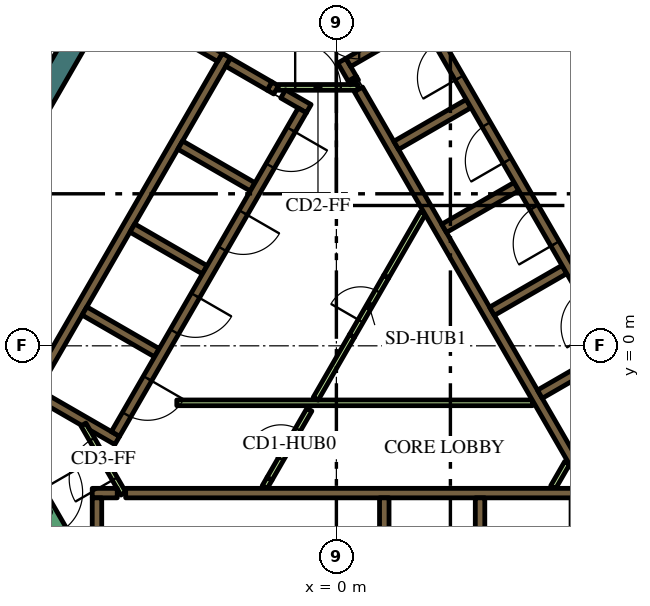
"""IFC4 building model, lengths in metres.
Left out: names, types, materials, properties, quantities, classifications, styles, units other than length and angle.
Written with IfcOpenShell. Run it as: python <this file> out.ifc"""

import sys

from ifc_helpers import new_model, si_unit, direction, frame, frame_2d, origin, place, context, subcontext, project, spatial, polyline, rectangle, outline, extrude, element, fill, save


model = new_model("IFC4")
c1 = context("Model", 3, precision=1e-05, world=origin(), true_north=direction((0.0, 1.0)))
c2 = subcontext(c1, "Body", "Model", "MODEL_VIEW")
j1 = project(units=[si_unit("LENGTHUNIT", "METRE"), si_unit("PLANEANGLEUNIT", "RADIAN")], contexts=[c1])
p1 = place(None, origin())
s1 = spatial("IfcSite", under=j1, at=p1, CompositionType="ELEMENT")
p2 = place(p1, origin())
s2 = spatial("IfcBuilding", under=s1, at=p2, CompositionType="ELEMENT")
p3 = place(p2, frame((0.0, 0.0, 321.6)))
s3 = spatial("IfcBuildingStorey", under=s2, at=p3, CompositionType="ELEMENT", Elevation=321.6)
p4 = place(p3, frame((1.989, 16.456, 0.0), z_axis=(0.0, 0.0, 1.0), x_axis=(0.49999102663, -0.8660305845, 0.0)))
e1 = element("IfcWall", 1, at=p4, inside=s3, PredefinedType="SOLIDWALL", context=c2, shape_type="SweptSolid", body=[
    extrude(rectangle(XDim=12.406, YDim=0.6, at=frame_2d((6.203, 0.0))), origin(), (0.0, 0.0, 1.0), 6.0),
])
p5 = place(p3, frame((-4.652, 11.842, 0.0), z_axis=(0.0, 0.0, 1.0), x_axis=(-0.500003640647, -0.866023301845, 0.0)))
e2 = element("IfcWall", 2, at=p5, inside=s3, PredefinedType="SOLIDWALL", context=c2, shape_type="SweptSolid", body=[
    extrude(rectangle(XDim=15.858, YDim=0.6, at=frame_2d((7.929, 0.0))), origin(), (0.0, 0.0, 1.0), 6.0),
])
p6 = place(p3, frame((-5.545, -3.875, 0.0), z_axis=(0.0, 0.0, 1.0), x_axis=(1.0, 0.0, 0.0)))
e3 = element("IfcWall", 3, at=p6, inside=s3, PredefinedType="SOLIDWALL", context=c2, shape_type="SweptSolid", body=[
    extrude(rectangle(XDim=11.97, YDim=0.25, at=frame_2d((5.985, 0.0))), origin(), (0.0, 0.0, 1.0), 6.0),
])
p7 = place(p3, frame((-6.425, -3.875, 0.0), z_axis=(0.0, 0.0, 1.0), x_axis=(1.0, 0.0, 0.0)))
e4 = element("IfcWall", 4, at=p7, inside=s3, PredefinedType="SOLIDWALL", context=c2, shape_type="SweptSolid", body=[
    extrude(rectangle(XDim=0.658, YDim=0.25, at=frame_2d((0.329, 0.0))), origin(), (0.0, 0.0, 1.0), 6.0),
])
for number, where, z_axis, x_axis in (
    (5, (3.78, -4.0, 0.0), (0.0, 0.0, 1.0), (0.0, -1.0, 0.0)),
    (6, (1.26, -4.0, 0.0), (0.0, 0.0, 1.0), (0.0, -1.0, 0.0)),
):
    element("IfcWall", number, at=place(p3, frame(where, z_axis=z_axis, x_axis=x_axis)), inside=s3, PredefinedType="SOLIDWALL", context=c2, shape_type="SweptSolid", body=[
        extrude(rectangle(XDim=2.2, YDim=0.25, at=frame_2d((1.1, 0.0))), origin(), (0.0, 0.0, 1.0), 6.0),
    ])
p8 = place(p3, frame((-6.3, -7.125, 0.0), z_axis=(0.0, 0.0, 1.0), x_axis=(0.0, 1.0, 0.0)))
e7 = element("IfcWall", 7, at=p8, inside=s3, PredefinedType="SOLIDWALL", context=c2, shape_type="SweptSolid", body=[
    extrude(rectangle(XDim=3.125, YDim=0.25, at=frame_2d((1.562, 0.0))), origin(), (0.0, 0.0, 1.0), 6.0),
])
p9 = place(p3, frame((0.473, 6.93, 0.0), z_axis=(0.0, 0.0, 1.0), x_axis=(-0.49972245349, 0.866185586049, 0.0)))
e8 = element("IfcWall", 8, at=p9, inside=s3, PredefinedType="SOLIDWALL", context=c2, shape_type="SweptSolid", body=[
    extrude(rectangle(XDim=0.11, YDim=0.25, at=frame_2d((0.055, 0.0))), origin(), (0.0, 0.0, 1.0), 6.0),
])
p10 = place(p3, frame((6.568, -3.627, 0.0), z_axis=(0.0, 0.0, 1.0), x_axis=(-0.499999455981, 0.866025717874, 0.0)))
e9 = element("IfcWall", 9, at=p10, inside=s3, PredefinedType="SOLIDWALL", context=c2, shape_type="SweptSolid", body=[
    extrude(rectangle(XDim=11.978, YDim=0.25, at=frame_2d((5.989, 0.0))), origin(), (0.0, 0.0, 1.0), 6.0),
])
p11 = place(p3, frame((0.417, 7.027, 0.0), z_axis=(0.0, 0.0, 1.0), x_axis=(-0.500210807569, 0.865903659763, 0.0)))
e10 = element("IfcWall", 10, at=p11, inside=s3, PredefinedType="SOLIDWALL", context=c2, shape_type="SweptSolid", body=[
    extrude(rectangle(XDim=0.548, YDim=0.25, at=frame_2d((0.274, 0.0))), origin(), (0.0, 0.0, 1.0), 6.0),
])
p12 = place(p3, frame((3.1, 9.064, 0.0), z_axis=(0.0, 0.0, 1.0), x_axis=(-0.866030133475, -0.499991807846, 0.0)))
e11 = element("IfcWall", 11, at=p12, inside=s3, PredefinedType="SOLIDWALL", context=c2, shape_type="SweptSolid", body=[
    extrude(rectangle(XDim=3.217, YDim=0.25, at=frame_2d((1.608, 0.0))), origin(), (0.0, 0.0, 1.0), 6.0),
])
p13 = place(p3, frame((1.574, 5.274, 0.0), z_axis=(0.0, 0.0, 1.0), x_axis=(0.866028486751, 0.499994660107, 0.0)))
e12 = element("IfcWall", 12, at=p13, inside=s3, PredefinedType="SOLIDWALL", context=c2, shape_type="SweptSolid", body=[
    extrude(rectangle(XDim=2.2, YDim=0.25, at=frame_2d((1.1, 0.0))), origin(), (0.0, 0.0, 1.0), 6.0),
])
for number, where, z_axis, x_axis in (
    (13, (2.834, 3.091, 0.0), (0.0, 0.0, 1.0), (0.866, 0.5, 0.0)),
    (14, (4.094, 0.909, 0.0), (0.0, 0.0, 1.0), (0.866, 0.5, 0.0)),
    (15, (5.354, -1.274, 0.0), (0.0, 0.0, 1.0), (0.866, 0.5, 0.0)),
):
    element("IfcWall", number, at=place(p3, frame(where, z_axis=z_axis, x_axis=x_axis)), inside=s3, PredefinedType="SOLIDWALL", context=c2, shape_type="SweptSolid", body=[
        extrude(rectangle(XDim=2.2, YDim=0.25, at=frame_2d((1.1, 0.0))), origin(), (0.0, 0.0, 1.0), 6.0),
    ])
p14 = place(p3, frame((-8.06, -1.311, 0.0), z_axis=(0.0, 0.0, 1.0), x_axis=(0.50000273126, 0.866023826885, 0.0)))
e16 = element("IfcWall", 16, at=p14, inside=s3, PredefinedType="SOLIDWALL", context=c2, shape_type="SweptSolid", body=[
    extrude(rectangle(XDim=10.33, YDim=0.25, at=frame_2d((5.165, 0.0))), origin(), (0.0, 0.0, 1.0), 6.0),
])
p15 = place(p3, frame((-1.758, 6.835, 0.0), z_axis=(0.0, 0.0, 1.0), x_axis=(0.865982457891, -0.500074377092, 0.0)))
e17 = element("IfcWall", 17, at=p15, inside=s3, PredefinedType="SOLIDWALL", context=c2, shape_type="SweptSolid", body=[
    extrude(rectangle(XDim=0.2, YDim=0.25, at=frame_2d((0.1, 0.0))), origin(), (0.0, 0.0, 1.0), 6.0),
])
p16 = place(p3, frame((-1.76, 6.836, 0.0), z_axis=(0.0, 0.0, 1.0), x_axis=(-0.865952863304, 0.500125622755, 0.0)))
e18 = element("IfcWall", 18, at=p16, inside=s3, PredefinedType="SOLIDWALL", context=c2, shape_type="SweptSolid", body=[
    extrude(rectangle(XDim=1.258, YDim=0.25, at=frame_2d((0.629, 0.0))), origin(), (0.0, 0.0, 1.0), 6.0),
])
p17 = place(p3, frame((-0.728, 6.24, 0.0), z_axis=(0.0, 0.0, 1.0), x_axis=(-0.865955664968, 0.500120771724, 0.0)))
e19 = element("IfcWall", 19, at=p17, inside=s3, PredefinedType="SOLIDWALL", context=c2, shape_type="SweptSolid", body=[
    extrude(rectangle(XDim=0.778, YDim=0.25, at=frame_2d((0.389, 0.0))), origin(), (0.0, 0.0, 1.0), 6.0),
])
for number, where, z_axis, x_axis in (
    (20, (-2.204, 4.182, 0.0), (0.0, 0.0, 1.0), (-0.866, 0.5, 0.0)),
    (21, (-5.369, 3.1, 0.0), (0.0, 0.0, 1.0), (0.866, -0.5, 0.0)),
    (22, (-4.724, -0.182, 0.0), (0.0, 0.0, 1.0), (-0.866, 0.5, 0.0)),
):
    element("IfcWall", number, at=place(p3, frame(where, z_axis=z_axis, x_axis=x_axis)), inside=s3, PredefinedType="SOLIDWALL", context=c2, shape_type="SweptSolid", body=[
        extrude(rectangle(XDim=2.2, YDim=0.25, at=frame_2d((1.1, 0.0))), origin(), (0.0, 0.0, 1.0), 6.0),
    ])
p18 = place(p3, origin())
e23 = element("IfcWall", 23, at=p18, inside=s3, PredefinedType="SOLIDWALL", context=c2, shape_type="SweptSolid", body=[
    extrude(outline(polyline([(-5.922, -2.257), (-5.922, -2.257), (-5.705, -2.382), (-5.83, -2.598), (-6.483, -2.221), (-6.591, -2.033), (-6.591, -2.033), (-6.7, -2.096), (-7.952, -1.373), (-7.827, -1.156), (-5.922, -2.257)])), origin(), (0.0, 0.0, 1.0), 6.0),
])
p19 = place(p3, frame((-3.066, 7.59, 0.0), z_axis=(0.0, 0.0, 1.0), x_axis=(-0.866081358704, 0.49990307071, 0.0)))
e24 = element("IfcWall", 24, at=p19, inside=s3, PredefinedType="SOLIDWALL", context=c2, shape_type="SweptSolid", body=[
    extrude(rectangle(XDim=0.858, YDim=0.25, at=frame_2d((0.429, 0.0))), origin(), (0.0, 0.0, 1.0), 6.0),
])
p20 = place(p3, frame((5.705, -3.718, 0.0), z_axis=(0.0, 0.0, 1.0), x_axis=(0.499962090823, 0.866047289552, 0.0)))
e25 = element("IfcWall", 25, at=p20, inside=s3, PredefinedType="PARTITIONING", context=c2, shape_type="SweptSolid", body=[
    extrude(rectangle(XDim=0.735, YDim=0.15, at=frame_2d((0.367, 0.0))), origin(), (0.0, 0.0, 1.0), 5.3),
])
p21 = place(p3, frame((-4.2, -1.5, 0.0), z_axis=(0.0, 0.0, 1.0), x_axis=(1.0, 0.0, 0.0)))
e26 = element("IfcWall", 26, at=p21, inside=s3, PredefinedType="PARTITIONING", context=c2, shape_type="SweptSolid", body=[
    extrude(rectangle(XDim=9.359, YDim=0.15, at=frame_2d((4.68, 0.0))), origin(), (0.0, 0.0, 1.0), 5.3),
])
p22 = place(p3, frame((-0.544, -1.393, 0.0), z_axis=(0.0, 0.0, 1.0), x_axis=(0.499928740635, 0.866066541489, 0.0)))
e27 = element("IfcWall", 27, at=p22, inside=s3, PredefinedType="PARTITIONING", context=c2, shape_type="SweptSolid", body=[
    extrude(rectangle(XDim=1.912, YDim=0.15, at=frame_2d((0.956, 0.0))), origin(), (0.0, 0.0, 1.0), 5.3),
])
p23 = place(p3, frame((1.312, 1.822, 0.0), z_axis=(0.0, 0.0, 1.0), x_axis=(0.500003549559, 0.866023354436, 0.0)))
e28 = element("IfcWall", 28, at=p23, inside=s3, PredefinedType="PARTITIONING", context=c2, shape_type="SweptSolid", body=[
    extrude(rectangle(XDim=1.93, YDim=0.15, at=frame_2d((0.965, 0.0))), origin(), (0.0, 0.0, 1.0), 5.3),
])
p24 = place(p3, frame((-1.887, -3.718, 0.0), z_axis=(0.0, 0.0, 1.0), x_axis=(0.500165633897, 0.865929753888, 0.0)))
e29 = element("IfcWall", 29, at=p24, inside=s3, PredefinedType="PARTITIONING", context=c2, shape_type="SweptSolid", body=[
    extrude(rectangle(XDim=0.254, YDim=0.15, at=frame_2d((0.127, 0.0))), origin(), (0.0, 0.0, 1.0), 5.3),
])
p25 = place(p3, frame((8.565, -2.185, 0.0), z_axis=(0.0, 0.0, 1.0), x_axis=(-0.499997954832, 0.866026584559, 0.0)))
e30 = element("IfcWall", 30, at=p25, inside=s3, PredefinedType="SOLIDWALL", context=c2, shape_type="SweptSolid", body=[
    extrude(rectangle(XDim=12.35, YDim=0.25, at=frame_2d((6.175, 0.0))), origin(), (0.0, 0.0, 1.0), 6.0),
])
p26 = place(p25, frame((0.685, 0.0, 0.0)))
e31 = element("IfcOpeningElement", 31, at=p26, cuts=e30, PredefinedType="OPENING", context=c2, shape_type="SweptSolid", body=[
    extrude(rectangle(XDim=0.9, YDim=2.1, at=frame_2d((0.45, 1.05))), frame((0.0, 0.135, 0.0), z_axis=(0.0, -1.0, 0.0), x_axis=(1.0, 0.0, 0.0)), (0.0, 0.0, 1.0), 0.27),
])
p27 = place(p25, frame((3.105, 0.0, 0.0)))
e32 = element("IfcOpeningElement", 32, at=p27, cuts=e30, PredefinedType="OPENING", context=c2, shape_type="SweptSolid", body=[
    extrude(rectangle(XDim=1.1, YDim=2.1, at=frame_2d((0.55, 1.05))), frame((0.0, 0.135, 0.0), z_axis=(0.0, -1.0, 0.0), x_axis=(1.0, 0.0, 0.0)), (0.0, 0.0, 1.0), 0.27),
])
p28 = place(p25, frame((5.625, 0.0, 0.0)))
e33 = element("IfcOpeningElement", 33, at=p28, cuts=e30, PredefinedType="OPENING", context=c2, shape_type="SweptSolid", body=[
    extrude(rectangle(XDim=1.1, YDim=2.1, at=frame_2d((0.55, 1.05))), frame((0.0, 0.135, 0.0), z_axis=(0.0, -1.0, 0.0), x_axis=(1.0, 0.0, 0.0)), (0.0, 0.0, 1.0), 0.27),
])
p29 = place(p25, frame((8.145, 0.0, 0.0)))
e34 = element("IfcOpeningElement", 34, at=p29, cuts=e30, PredefinedType="OPENING", context=c2, shape_type="SweptSolid", body=[
    extrude(rectangle(XDim=1.1, YDim=2.1, at=frame_2d((0.55, 1.05))), frame((0.0, 0.135, 0.0), z_axis=(0.0, -1.0, 0.0), x_axis=(1.0, 0.0, 0.0)), (0.0, 0.0, 1.0), 0.27),
])
p30 = place(p25, frame((10.665, 0.0, 0.0)))
e35 = element("IfcOpeningElement", 35, at=p30, cuts=e30, PredefinedType="OPENING", context=c2, shape_type="SweptSolid", body=[
    extrude(rectangle(XDim=1.1, YDim=2.1, at=frame_2d((0.55, 1.05))), frame((0.0, 0.135, 0.0), z_axis=(0.0, -1.0, 0.0), x_axis=(1.0, 0.0, 0.0)), (0.0, 0.0, 1.0), 0.27),
])
p31 = place(p3, frame((-0.898, 6.194, 0.0), z_axis=(0.0, 0.0, 1.0), x_axis=(-0.499996202215, -0.866027596426, 0.0)))
e36 = element("IfcWall", 36, at=p31, inside=s3, PredefinedType="SOLIDWALL", context=c2, shape_type="SweptSolid", body=[
    extrude(rectangle(XDim=9.83, YDim=0.25, at=frame_2d((4.915, 0.0))), origin(), (0.0, 0.0, 1.0), 6.0),
])
p32 = place(p31, frame((0.585, 0.0, 0.0)))
e37 = element("IfcOpeningElement", 37, at=p32, cuts=e36, PredefinedType="OPENING", context=c2, shape_type="SweptSolid", body=[
    extrude(rectangle(XDim=1.1, YDim=2.1, at=frame_2d((0.55, 1.05))), frame((0.0, 0.135, 0.0), z_axis=(0.0, -1.0, 0.0), x_axis=(1.0, 0.0, 0.0)), (0.0, 0.0, 1.0), 0.27),
])
p33 = place(p31, frame((3.105, 0.0, 0.0)))
e38 = element("IfcOpeningElement", 38, at=p33, cuts=e36, PredefinedType="OPENING", context=c2, shape_type="SweptSolid", body=[
    extrude(rectangle(XDim=1.1, YDim=2.1, at=frame_2d((0.55, 1.05))), frame((0.0, 0.135, 0.0), z_axis=(0.0, -1.0, 0.0), x_axis=(1.0, 0.0, 0.0)), (0.0, 0.0, 1.0), 0.27),
])
p34 = place(p31, frame((5.625, 0.0, 0.0)))
e39 = element("IfcOpeningElement", 39, at=p34, cuts=e36, PredefinedType="OPENING", context=c2, shape_type="SweptSolid", body=[
    extrude(rectangle(XDim=1.1, YDim=2.1, at=frame_2d((0.55, 1.05))), frame((0.0, 0.135, 0.0), z_axis=(0.0, -1.0, 0.0), x_axis=(1.0, 0.0, 0.0)), (0.0, 0.0, 1.0), 0.27),
])
p35 = place(p31, frame((8.145, 0.0, 0.0)))
e40 = element("IfcOpeningElement", 40, at=p35, cuts=e36, PredefinedType="OPENING", context=c2, shape_type="SweptSolid", body=[
    extrude(rectangle(XDim=1.1, YDim=2.1, at=frame_2d((0.55, 1.05))), frame((0.0, 0.135, 0.0), z_axis=(0.0, -1.0, 0.0), x_axis=(1.0, 0.0, 0.0)), (0.0, 0.0, 1.0), 0.27),
])
p36 = place(p3, frame((-8.103, -3.466, 0.0), z_axis=(0.0, 0.0, 1.0), x_axis=(0.500078061341, -0.865980330357, 0.0)))
e41 = element("IfcWall", 41, at=p36, inside=s3, PredefinedType="SOLIDWALL", context=c2, shape_type="SweptSolid", body=[
    extrude(rectangle(XDim=2.1, YDim=0.4, at=frame_2d((1.05, 0.0))), origin(), (0.0, 0.0, 1.0), 6.0),
])
p37 = place(p36, frame((0.45, 0.0, 0.0)))
e42 = element("IfcOpeningElement", 42, at=p37, cuts=e41, PredefinedType="OPENING", context=c2, shape_type="SweptSolid", body=[
    extrude(rectangle(XDim=1.2, YDim=2.1, at=frame_2d((0.6, 1.05))), frame((0.0, 0.21, 0.0), z_axis=(0.0, -1.0, 0.0), x_axis=(1.0, 0.0, 0.0)), (0.0, 0.0, 1.0), 0.42),
])
p38 = place(p3, frame((-1.76, -3.498, 0.0), z_axis=(0.0, 0.0, 1.0), x_axis=(0.499977374825, 0.866038466041, 0.0)))
e43 = element("IfcWall", 43, at=p38, inside=s3, PredefinedType="PARTITIONING", context=c2, shape_type="SweptSolid", body=[
    extrude(rectangle(XDim=2.1, YDim=0.15, at=frame_2d((1.05, 0.0))), origin(), (0.0, 0.0, 1.0), 5.3),
])
p39 = place(p38, frame((0.6, 0.0, 0.0)))
e44 = element("IfcOpeningElement", 44, at=p39, cuts=e43, PredefinedType="OPENING", context=c2, shape_type="SweptSolid", body=[
    extrude(rectangle(XDim=0.9, YDim=2.1, at=frame_2d((0.45, 1.05))), frame((0.0, 0.085, 0.0), z_axis=(0.0, -1.0, 0.0), x_axis=(1.0, 0.0, 0.0)), (0.0, 0.0, 1.0), 0.17),
])
p40 = place(p3, frame((-1.534, 6.8, 0.0), z_axis=(0.0, 0.0, 1.0), x_axis=(1.0, 0.0, 0.0)))
e45 = element("IfcWall", 45, at=p40, inside=s3, PredefinedType="PARTITIONING", context=c2, shape_type="SweptSolid", body=[
    extrude(rectangle(XDim=2.1, YDim=0.15, at=frame_2d((1.05, 0.0))), origin(), (0.0, 0.0, 1.0), 5.3),
])
p41 = place(p40, frame((0.45, 0.0, 0.0)))
e46 = element("IfcOpeningElement", 46, at=p41, cuts=e45, PredefinedType="OPENING", context=c2, shape_type="SweptSolid", body=[
    extrude(rectangle(XDim=1.2, YDim=2.1, at=frame_2d((0.6, 1.05))), frame((0.0, 0.085, 0.0), z_axis=(0.0, -1.0, 0.0), x_axis=(1.0, 0.0, 0.0)), (0.0, 0.0, 1.0), 0.17),
])
p42 = place(p3, frame((-5.606, -3.89, 0.0), z_axis=(0.0, 0.0, 1.0), x_axis=(-0.500027713859, 0.866009402589, 0.0)))
e47 = element("IfcWall", 47, at=p42, inside=s3, PredefinedType="PARTITIONING", context=c2, shape_type="SweptSolid", body=[
    extrude(rectangle(XDim=2.1, YDim=0.15, at=frame_2d((1.05, 0.0))), origin(), (0.0, 0.0, 1.0), 5.3),
])
p43 = place(p42, frame((0.45, 0.0, 0.0)))
e48 = element("IfcOpeningElement", 48, at=p43, cuts=e47, PredefinedType="OPENING", context=c2, shape_type="SweptSolid", body=[
    extrude(rectangle(XDim=1.2, YDim=2.1, at=frame_2d((0.6, 1.05))), frame((0.0, 0.085, 0.0), z_axis=(0.0, -1.0, 0.0), x_axis=(1.0, 0.0, 0.0)), (0.0, 0.0, 1.0), 0.17),
])
p44 = place(p3, frame((0.412, 0.263, 0.0), z_axis=(0.0, 0.0, 1.0), x_axis=(0.500062916607, 0.865989075817, 0.0)))
e49 = element("IfcWall", 49, at=p44, inside=s3, PredefinedType="PARTITIONING", context=c2, shape_type="SweptSolid", body=[
    extrude(rectangle(XDim=1.8, YDim=0.15, at=frame_2d((0.9, 0.0))), origin(), (0.0, 0.0, 1.0), 5.3),
])
p45 = place(p44, frame((0.45, 0.0, 0.0)))
e50 = element("IfcOpeningElement", 50, at=p45, cuts=e49, PredefinedType="OPENING", context=c2, shape_type="SweptSolid", body=[
    extrude(rectangle(XDim=0.9, YDim=2.1, at=frame_2d((0.45, 1.05))), frame((0.0, 0.085, 0.0), z_axis=(0.0, -1.0, 0.0), x_axis=(1.0, 0.0, 0.0)), (0.0, 0.0, 1.0), 0.17),
])
p46 = place(p3, frame((-3.984, 19.6, 0.0), z_axis=(0.0, 0.0, 1.0), x_axis=(-0.500001742692, -0.866024397638, 0.0)))
e51 = element("IfcWall", 51, at=p46, inside=s3, PredefinedType="PARTITIONING", context=c2, shape_type="SweptSolid", body=[
    extrude(rectangle(XDim=29.965, YDim=0.15, at=frame_2d((14.982, 0.0))), origin(), (0.0, 0.0, 1.0), 5.3),
])
p47 = place(p46, frame((14.082, 0.0, 0.0)))
e52 = element("IfcOpeningElement", 52, at=p47, cuts=e51, PredefinedType="OPENING", context=c2, shape_type="SweptSolid", body=[
    extrude(rectangle(XDim=1.8, YDim=2.1, at=frame_2d((0.9, 1.05))), frame((0.0, 0.085, 0.0), z_axis=(0.0, -1.0, 0.0), x_axis=(1.0, 0.0, 0.0)), (0.0, 0.0, 1.0), 0.17),
])
p48 = place(p46, frame((9.894, 0.0, 0.0)))
e53 = element("IfcOpeningElement", 53, at=p48, cuts=e51, PredefinedType="OPENING", context=c2, shape_type="SweptSolid", body=[
    extrude(rectangle(XDim=1.8, YDim=2.1, at=frame_2d((0.9, 1.05))), frame((0.0, 0.085, 0.0), z_axis=(0.0, -1.0, 0.0), x_axis=(1.0, 0.0, 0.0)), (0.0, 0.0, 1.0), 0.17),
])
p49 = place(p28, origin())
e54 = element("IfcDoor", 54, at=p49, inside=s3, OperationType="DOUBLE_DOOR_SLIDING", PredefinedType="DOOR", context=c2, shape_type="SweptSolid", body=[
    extrude(rectangle(XDim=1.1, YDim=2.1, at=frame_2d((0.55, 1.05))), frame((0.0, 0.025, 0.0), z_axis=(0.0, -1.0, 0.0), x_axis=(1.0, 0.0, 0.0)), (0.0, 0.0, 1.0), 0.05),
])
fill(e33, e54)
p50 = place(p29, origin())
e55 = element("IfcDoor", 55, at=p50, inside=s3, OperationType="DOUBLE_DOOR_SLIDING", PredefinedType="DOOR", context=c2, shape_type="SweptSolid", body=[
    extrude(rectangle(XDim=1.1, YDim=2.1, at=frame_2d((0.55, 1.05))), frame((0.0, 0.025, 0.0), z_axis=(0.0, -1.0, 0.0), x_axis=(1.0, 0.0, 0.0)), (0.0, 0.0, 1.0), 0.05),
])
fill(e34, e55)
p51 = place(p30, origin())
e56 = element("IfcDoor", 56, at=p51, inside=s3, OperationType="DOUBLE_DOOR_SLIDING", PredefinedType="DOOR", context=c2, shape_type="SweptSolid", body=[
    extrude(rectangle(XDim=1.1, YDim=2.1, at=frame_2d((0.55, 1.05))), frame((0.0, 0.025, 0.0), z_axis=(0.0, -1.0, 0.0), x_axis=(1.0, 0.0, 0.0)), (0.0, 0.0, 1.0), 0.05),
])
fill(e35, e56)
p52 = place(p32, origin())
e57 = element("IfcDoor", 57, at=p52, inside=s3, OperationType="DOUBLE_DOOR_SLIDING", PredefinedType="DOOR", context=c2, shape_type="SweptSolid", body=[
    extrude(rectangle(XDim=1.1, YDim=2.1, at=frame_2d((0.55, 1.05))), frame((0.0, 0.025, 0.0), z_axis=(0.0, -1.0, 0.0), x_axis=(1.0, 0.0, 0.0)), (0.0, 0.0, 1.0), 0.05),
])
fill(e37, e57)
p53 = place(p33, origin())
e58 = element("IfcDoor", 58, at=p53, inside=s3, OperationType="DOUBLE_DOOR_SLIDING", PredefinedType="DOOR", context=c2, shape_type="SweptSolid", body=[
    extrude(rectangle(XDim=1.1, YDim=2.1, at=frame_2d((0.55, 1.05))), frame((0.0, 0.025, 0.0), z_axis=(0.0, -1.0, 0.0), x_axis=(1.0, 0.0, 0.0)), (0.0, 0.0, 1.0), 0.05),
])
fill(e38, e58)
p54 = place(p34, origin())
e59 = element("IfcDoor", 59, at=p54, inside=s3, OperationType="DOUBLE_DOOR_SLIDING", PredefinedType="DOOR", context=c2, shape_type="SweptSolid", body=[
    extrude(rectangle(XDim=1.1, YDim=2.1, at=frame_2d((0.55, 1.05))), frame((0.0, 0.025, 0.0), z_axis=(0.0, -1.0, 0.0), x_axis=(1.0, 0.0, 0.0)), (0.0, 0.0, 1.0), 0.05),
])
fill(e39, e59)
p55 = place(p35, origin())
e60 = element("IfcDoor", 60, at=p55, inside=s3, OperationType="DOUBLE_DOOR_SLIDING", PredefinedType="DOOR", context=c2, shape_type="SweptSolid", body=[
    extrude(rectangle(XDim=1.1, YDim=2.1, at=frame_2d((0.55, 1.05))), frame((0.0, 0.025, 0.0), z_axis=(0.0, -1.0, 0.0), x_axis=(1.0, 0.0, 0.0)), (0.0, 0.0, 1.0), 0.05),
])
fill(e40, e60)
p56 = place(p37, origin())
e61 = element("IfcDoor", 61, at=p56, inside=s3, OperationType="SINGLE_SWING_LEFT", PredefinedType="DOOR", context=c2, shape_type="SweptSolid", body=[
    extrude(rectangle(XDim=1.2, YDim=2.1, at=frame_2d((0.6, 1.05))), frame((0.0, 0.025, 0.0), z_axis=(0.0, -1.0, 0.0), x_axis=(1.0, 0.0, 0.0)), (0.0, 0.0, 1.0), 0.05),
])
fill(e42, e61)
p57 = place(p39, origin())
e62 = element("IfcDoor", 62, at=p57, inside=s3, OperationType="SINGLE_SWING_LEFT", PredefinedType="DOOR", context=c2, shape_type="SweptSolid", body=[
    extrude(rectangle(XDim=0.9, YDim=2.1, at=frame_2d((0.45, 1.05))), frame((0.0, 0.025, 0.0), z_axis=(0.0, -1.0, 0.0), x_axis=(1.0, 0.0, 0.0)), (0.0, 0.0, 1.0), 0.05),
])
fill(e44, e62)
p58 = place(p41, origin())
e63 = element("IfcDoor", 63, at=p58, inside=s3, OperationType="SINGLE_SWING_LEFT", PredefinedType="DOOR", context=c2, shape_type="SweptSolid", body=[
    extrude(rectangle(XDim=1.2, YDim=2.1, at=frame_2d((0.6, 1.05))), frame((0.0, 0.025, 0.0), z_axis=(0.0, -1.0, 0.0), x_axis=(1.0, 0.0, 0.0)), (0.0, 0.0, 1.0), 0.05),
])
fill(e46, e63)
p59 = place(p43, origin())
e64 = element("IfcDoor", 64, at=p59, inside=s3, OperationType="SINGLE_SWING_LEFT", PredefinedType="DOOR", context=c2, shape_type="SweptSolid", body=[
    extrude(rectangle(XDim=1.2, YDim=2.1, at=frame_2d((0.6, 1.05))), frame((0.0, 0.025, 0.0), z_axis=(0.0, -1.0, 0.0), x_axis=(1.0, 0.0, 0.0)), (0.0, 0.0, 1.0), 0.05),
])
fill(e48, e64)
p60 = place(p45, origin())
e65 = element("IfcDoor", 65, at=p60, inside=s3, OperationType="SINGLE_SWING_LEFT", PredefinedType="DOOR", context=c2, shape_type="SweptSolid", body=[
    extrude(rectangle(XDim=0.9, YDim=2.1, at=frame_2d((0.45, 1.05))), frame((0.0, 0.025, 0.0), z_axis=(0.0, -1.0, 0.0), x_axis=(1.0, 0.0, 0.0)), (0.0, 0.0, 1.0), 0.05),
])
fill(e50, e65)
save(model, sys.argv[1])
